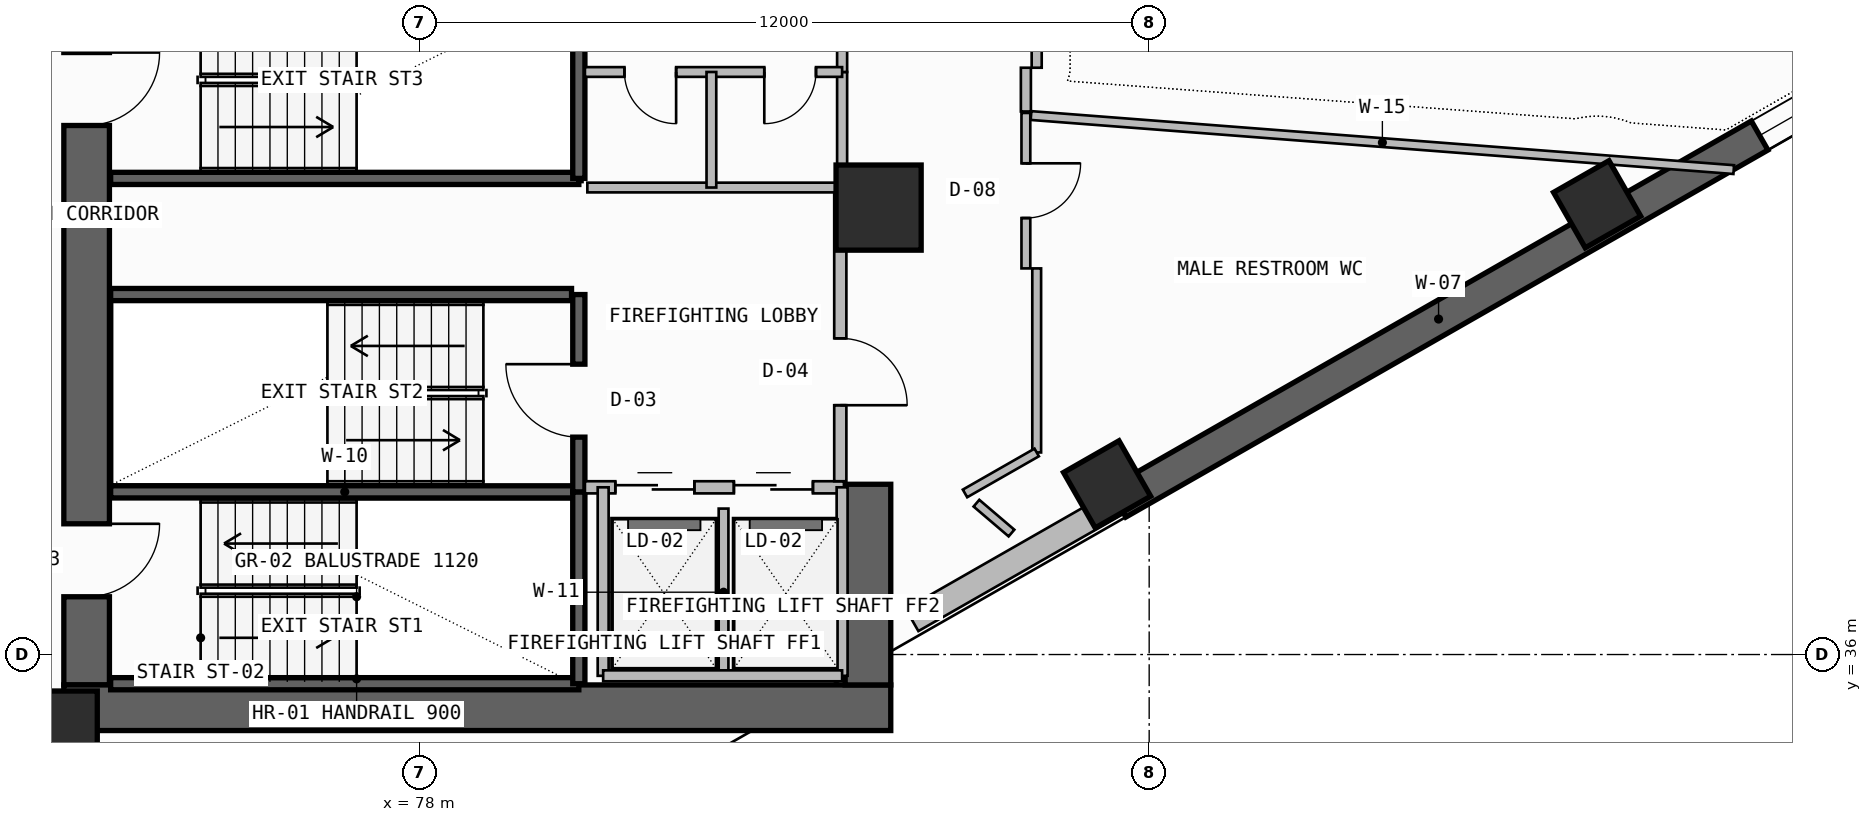
"""IFC4 building model, lengths in metres.
Left out: names, types, materials, properties, quantities, classifications, styles, units other than length and angle.
Written with IfcOpenShell. Run it as: python <this file> out.ifc"""

import sys

from ifc_helpers import new_model, si_unit, direction, frame, frame_2d, origin, origin_2d, place, context, subcontext, project, spatial, rectangle, extrude, element, fill, save


model = new_model("IFC4")
c1 = context("Model", 3, precision=1e-05, world=origin(), true_north=direction((0.0, 1.0)))
c2 = subcontext(c1, "Body", "Model", "MODEL_VIEW")
j1 = project(units=[si_unit("LENGTHUNIT", "METRE"), si_unit("PLANEANGLEUNIT", "RADIAN")], contexts=[c1])
p1 = place(None, origin())
s1 = spatial("IfcSite", under=j1, at=p1, CompositionType="ELEMENT")
p2 = place(p1, origin())
s2 = spatial("IfcBuilding", under=s1, at=p2, CompositionType="ELEMENT")
p3 = place(p2, frame((0.0, 0.0, 218.5)))
s3 = spatial("IfcBuildingStorey", under=s2, at=p3, CompositionType="ELEMENT", Elevation=218.5)
p4 = place(p3, frame((72.525, 35.5, -0.26), z_axis=(0.0, 0.0, 1.0), x_axis=(0.0, 1.0, 0.0)))
e1 = element("IfcWall", 1, at=p4, inside=s3, PredefinedType="SHEAR", context=c2, shape_type="SweptSolid", body=[
    extrude(rectangle(XDim=7.85, YDim=0.75, at=frame_2d((3.925, 0.0))), origin(), (0.0, 0.0, 1.0), 3.52),
])
p5 = place(p4, frame((1.45, 0.0, 0.26)))
e2 = element("IfcOpeningElement", 2, at=p5, cuts=e1, PredefinedType="OPENING", context=c2, shape_type="SweptSolid", body=[
    extrude(rectangle(XDim=1.2, YDim=2.2, at=frame_2d((0.6, 1.1))), frame((0.0, 0.385, 0.0), z_axis=(0.0, -1.0, 0.0), x_axis=(1.0, 0.0, 0.0)), (0.0, 0.0, 1.0), 0.77),
])
p6 = place(p3, frame((72.15, 35.125, -0.26), z_axis=(0.0, 0.0, 1.0), x_axis=(1.0, 0.0, 0.0)))
e3 = element("IfcWall", 3, at=p6, inside=s3, PredefinedType="SHEAR", context=c2, shape_type="SweptSolid", body=[
    extrude(rectangle(XDim=13.6, YDim=0.75, at=frame_2d((6.8, 0.0))), origin(), (0.0, 0.0, 1.0), 3.52),
])
p7 = place(p3, frame((85.375, 35.5, -0.26), z_axis=(0.0, 0.0, 1.0), x_axis=(0.0, 1.0, 0.0)))
e4 = element("IfcWall", 4, at=p7, inside=s3, PredefinedType="SHEAR", context=c2, shape_type="SweptSolid", body=[
    extrude(rectangle(XDim=3.3, YDim=0.75, at=frame_2d((1.65, 0.0))), origin(), (0.0, 0.0, 1.0), 3.52),
])
p8 = place(p3, frame((72.525, 43.35, -0.26), z_axis=(0.0, 0.0, 1.0), x_axis=(0.0, 1.0, 0.0)))
e5 = element("IfcWall", 5, at=p8, inside=s3, PredefinedType="SHEAR", context=c2, shape_type="SweptSolid", body=[
    extrude(rectangle(XDim=12.7, YDim=0.75, at=frame_2d((6.35, 0.0))), origin(), (0.0, 0.0, 1.0), 3.52),
])
p9 = place(p8, frame((1.35, 0.0, 0.26)))
e6 = element("IfcOpeningElement", 6, at=p9, cuts=e5, PredefinedType="OPENING", context=c2, shape_type="SweptSolid", body=[
    extrude(rectangle(XDim=1.2, YDim=2.2, at=frame_2d((0.6, 1.1))), frame((0.0, 0.385, 0.0), z_axis=(0.0, -1.0, 0.0), x_axis=(1.0, 0.0, 0.0)), (0.0, 0.0, 1.0), 0.77),
])
for number, where, z_axis, x_axis in (
    (7, (72.0, 34.7, 0.0), (0.0, 0.0, 1.0), (1.0, 0.0, 0.0)),
    (8, (85.55, 43.35, 0.0), (0.0, 0.0, 1.0), (1.0, 0.0, 0.0)),
):
    element("IfcColumn", number, at=place(p3, frame(where, z_axis=z_axis, x_axis=x_axis)), inside=s3, PredefinedType="COLUMN", context=c2, shape_type="SweptSolid", body=[
        extrude(rectangle(XDim=1.4, YDim=1.4, at=origin_2d()), origin(), (0.0, 0.0, 1.0), 3.52),
    ])
for number, where, z_axis, x_axis in (
    (9, (89.308, 38.799, 0.0), (0.0, 0.0, 1.0), (0.868, 0.496, 0.0)),
    (10, (97.367, 43.405, 0.0), (0.0, 0.0, 1.0), (0.868, 0.496, 0.0)),
):
    element("IfcColumn", number, at=place(p3, frame(where, z_axis=z_axis, x_axis=x_axis)), inside=s3, PredefinedType="COLUMN", context=c2, shape_type="SweptSolid", body=[
        extrude(rectangle(XDim=1.05, YDim=1.05, at=origin_2d()), origin(), (0.0, 0.0, 1.0), 3.52),
    ])
p10 = place(p3, frame((86.1, 36.568, 0.0), z_axis=(0.0, 0.0, 1.0), x_axis=(0.868192956745, 0.496226752461, 0.0)))
e11 = element("IfcWall", 11, at=p10, inside=s3, PredefinedType="SOLIDWALL", context=c2, shape_type="SweptSolid", body=[
    extrude(rectangle(XDim=3.892, YDim=0.42, at=frame_2d((1.946, 0.0))), origin(), (0.0, 0.0, 1.0), 2.245),
])
p11 = place(p3, frame((89.479, 38.499, -0.26), z_axis=(0.0, 0.0, 1.0), x_axis=(0.868197136736, 0.496219439123, 0.0)))
e12 = element("IfcWall", 12, at=p11, inside=s3, PredefinedType="SHEAR", context=c2, shape_type="SweptSolid", body=[
    extrude(rectangle(XDim=17.636, YDim=0.55, at=frame_2d((8.818, 0.0))), origin(), (0.0, 0.0, 1.0), 3.52),
])
p12 = place(p11, frame((12.164, 0.0, 1.1)))
e13 = element("IfcOpeningElement", 13, at=p12, cuts=e12, PredefinedType="OPENING", context=c2, shape_type="SweptSolid", body=[
    extrude(rectangle(XDim=2.4, YDim=1.2, at=frame_2d((1.2, 0.6))), frame((0.0, 0.285, 0.0), z_axis=(0.0, -1.0, 0.0), x_axis=(1.0, 0.0, 0.0)), (0.0, 0.0, 1.0), 0.57),
])
for number, where, z_axis, x_axis in (
    (14, (72.92, 35.52, -0.26), (0.0, 0.0, 1.0), (1.0, 0.0, 0.0)),
    (15, (72.92, 38.675, -0.26), (0.0, 0.0, 1.0), (1.0, 0.0, 0.0)),
):
    element("IfcWall", number, at=place(p3, frame(where, z_axis=z_axis, x_axis=x_axis)), inside=s3, PredefinedType="SOLIDWALL", context=c2, shape_type="SweptSolid", body=[
        extrude(rectangle(XDim=7.7, YDim=0.2, at=frame_2d((3.85, 0.0))), origin(), (0.0, 0.0, 1.0), 3.52),
    ])
p13 = place(p3, frame((80.62, 35.52, -0.26), z_axis=(0.0, 0.0, 1.0), x_axis=(0.0, 1.0, 0.0)))
e16 = element("IfcWall", 16, at=p13, inside=s3, PredefinedType="SOLIDWALL", context=c2, shape_type="SweptSolid", body=[
    extrude(rectangle(XDim=3.155, YDim=0.2, at=frame_2d((1.578, 0.0))), origin(), (0.0, 0.0, 1.0), 3.52),
])
p14 = place(p3, frame((80.62, 38.675, -0.26), z_axis=(0.0, 0.0, 1.0), x_axis=(0.0, 1.0, 0.0)))
e17 = element("IfcWall", 17, at=p14, inside=s3, PredefinedType="SOLIDWALL", context=c2, shape_type="SweptSolid", body=[
    extrude(rectangle(XDim=3.245, YDim=0.2, at=frame_2d((1.623, 0.0))), origin(), (0.0, 0.0, 1.0), 3.52),
])
p15 = place(p14, frame((0.9, 0.0, 0.26)))
e18 = element("IfcOpeningElement", 18, at=p15, cuts=e17, PredefinedType="OPENING", context=c2, shape_type="SweptSolid", body=[
    extrude(rectangle(XDim=1.2, YDim=2.2, at=frame_2d((0.6, 1.1))), frame((0.0, 0.11, 0.0), z_axis=(0.0, -1.0, 0.0), x_axis=(1.0, 0.0, 0.0)), (0.0, 0.0, 1.0), 0.22),
])
p16 = place(p3, frame((80.72, 38.75, 0.0), z_axis=(0.0, 0.0, 1.0), x_axis=(1.0, 0.0, 0.0)))
e19 = element("IfcWall", 19, at=p16, inside=s3, PredefinedType="SOLIDWALL", context=c2, shape_type="SweptSolid", body=[
    extrude(rectangle(XDim=4.26, YDim=0.2, at=frame_2d((2.13, 0.0))), origin(), (0.0, 0.0, 1.0), 3.26),
])
p17 = place(p16, frame((0.5, 0.0, 0.0)))
e20 = element("IfcOpeningElement", 20, at=p17, cuts=e19, PredefinedType="OPENING", context=c2, shape_type="SweptSolid", body=[
    extrude(rectangle(XDim=1.3, YDim=2.3, at=frame_2d((0.65, 1.15))), frame((0.0, 0.11, 0.0), z_axis=(0.0, -1.0, 0.0), x_axis=(1.0, 0.0, 0.0)), (0.0, 0.0, 1.0), 0.22),
])
p18 = place(p16, frame((2.45, 0.0, 0.0)))
e21 = element("IfcOpeningElement", 21, at=p18, cuts=e19, PredefinedType="OPENING", context=c2, shape_type="SweptSolid", body=[
    extrude(rectangle(XDim=1.3, YDim=2.3, at=frame_2d((0.65, 1.15))), frame((0.0, 0.11, 0.0), z_axis=(0.0, -1.0, 0.0), x_axis=(1.0, 0.0, 0.0)), (0.0, 0.0, 1.0), 0.22),
])
p19 = place(p3, frame((83.0, 35.65, 0.0), z_axis=(0.0, 0.0, 1.0), x_axis=(0.0, 1.0, 0.0)))
e22 = element("IfcWall", 22, at=p19, inside=s3, PredefinedType="PLUMBINGWALL", context=c2, shape_type="SweptSolid", body=[
    extrude(rectangle(XDim=2.75, YDim=0.16, at=frame_2d((1.375, 0.0))), origin(), (0.0, 0.0, 1.0), 3.26),
])
for number, where, z_axis, x_axis in (
    (23, (84.95, 35.65, 0.0), (0.0, 0.0, 1.0), (0.0, 1.0, 0.0)),
    (24, (81.02, 35.65, 0.0), (0.0, 0.0, 1.0), (0.0, 1.0, 0.0)),
):
    element("IfcWall", number, at=place(p3, frame(where, z_axis=z_axis, x_axis=x_axis)), inside=s3, PredefinedType="SOLIDWALL", context=c2, shape_type="SweptSolid", body=[
        extrude(rectangle(XDim=3.1, YDim=0.18, at=frame_2d((1.55, 0.0))), origin(), (0.0, 0.0, 1.0), 3.26),
    ])
p20 = place(p3, frame((81.02, 35.65, 0.0), z_axis=(0.0, 0.0, 1.0), x_axis=(1.0, 0.0, 0.0)))
e25 = element("IfcWall", 25, at=p20, inside=s3, PredefinedType="SOLIDWALL", context=c2, shape_type="SweptSolid", body=[
    extrude(rectangle(XDim=3.93, YDim=0.18, at=frame_2d((1.965, 0.0))), origin(), (0.0, 0.0, 1.0), 3.26),
])
p21 = place(p3, frame((84.92, 38.85, 0.0), z_axis=(0.0, 0.0, 1.0), x_axis=(0.0, 1.0, 0.0)))
e26 = element("IfcWall", 26, at=p21, inside=s3, PredefinedType="SOLIDWALL", context=c2, shape_type="SweptSolid", body=[
    extrude(rectangle(XDim=4.83, YDim=0.2, at=frame_2d((2.415, 0.0))), origin(), (0.0, 0.0, 1.0), 3.26),
])
p22 = place(p21, frame((1.25, 0.0, 0.0)))
e27 = element("IfcOpeningElement", 27, at=p22, cuts=e26, PredefinedType="OPENING", context=c2, shape_type="SweptSolid", body=[
    extrude(rectangle(XDim=1.1, YDim=2.2, at=frame_2d((0.55, 1.1))), frame((0.0, 0.11, 0.0), z_axis=(0.0, -1.0, 0.0), x_axis=(1.0, 0.0, 0.0)), (0.0, 0.0, 1.0), 0.22),
])
p23 = place(p3, frame((72.92, 41.92, -0.26), z_axis=(0.0, 0.0, 1.0), x_axis=(1.0, 0.0, 0.0)))
e28 = element("IfcWall", 28, at=p23, inside=s3, PredefinedType="SOLIDWALL", context=c2, shape_type="SweptSolid", body=[
    extrude(rectangle(XDim=7.58, YDim=0.2, at=frame_2d((3.79, 0.0))), origin(), (0.0, 0.0, 1.0), 3.52),
])
p24 = place(p3, frame((72.92, 43.83, -0.26), z_axis=(0.0, 0.0, 1.0), x_axis=(1.0, 0.0, 0.0)))
e29 = element("IfcWall", 29, at=p24, inside=s3, PredefinedType="SOLIDWALL", context=c2, shape_type="SweptSolid", body=[
    extrude(rectangle(XDim=7.7, YDim=0.2, at=frame_2d((3.85, 0.0))), origin(), (0.0, 0.0, 1.0), 3.52),
])
p25 = place(p3, frame((80.62, 43.83, -0.26), z_axis=(0.0, 0.0, 1.0), x_axis=(0.0, 1.0, 0.0)))
e30 = element("IfcWall", 30, at=p25, inside=s3, PredefinedType="SOLIDWALL", context=c2, shape_type="SweptSolid", body=[
    extrude(rectangle(XDim=3.24, YDim=0.2, at=frame_2d((1.62, 0.0))), origin(), (0.0, 0.0, 1.0), 3.52),
])
p26 = place(p3, frame((84.95, 43.68, 0.0), z_axis=(0.0, 0.0, 1.0), x_axis=(0.0, 1.0, 0.0)))
e31 = element("IfcWall", 31, at=p26, inside=s3, PredefinedType="PLUMBINGWALL", context=c2, shape_type="SweptSolid", body=[
    extrude(rectangle(XDim=1.9, YDim=0.165, at=frame_2d((0.95, 0.0))), origin(), (0.0, 0.0, 1.0), 3.26),
])
p27 = place(p3, frame((84.95, 45.58, 0.0), z_axis=(0.0, 0.0, 1.0), x_axis=(0.0, 1.0, 0.0)))
e32 = element("IfcWall", 32, at=p27, inside=s3, PredefinedType="PARTITIONING", context=c2, shape_type="SweptSolid", body=[
    extrude(rectangle(XDim=2.12, YDim=0.165, at=frame_2d((1.06, 0.0))), origin(), (0.0, 0.0, 1.0), 3.26),
])
p28 = place(p27, frame((0.56, 0.0, 0.0)))
e33 = element("IfcOpeningElement", 33, at=p28, cuts=e32, PredefinedType="OPENING", context=c2, shape_type="SweptSolid", body=[
    extrude(rectangle(XDim=1.0, YDim=2.2, at=frame_2d((0.5, 1.1))), frame((0.0, 0.093, 0.0), z_axis=(0.0, -1.0, 0.0), x_axis=(1.0, 0.0, 0.0)), (0.0, 0.0, 1.0), 0.185),
])
p29 = place(p3, frame((80.72, 45.58, 0.0), z_axis=(0.0, 0.0, 1.0), x_axis=(1.0, 0.0, 0.0)))
e34 = element("IfcWall", 34, at=p29, inside=s3, PredefinedType="PLUMBINGWALL", context=c2, shape_type="SweptSolid", body=[
    extrude(rectangle(XDim=4.23, YDim=0.16, at=frame_2d((2.115, 0.0))), origin(), (0.0, 0.0, 1.0), 3.26),
])
p30 = place(p29, frame((0.65, 0.0, 0.0)))
e35 = element("IfcOpeningElement", 35, at=p30, cuts=e34, PredefinedType="OPENING", context=c2, shape_type="SweptSolid", body=[
    extrude(rectangle(XDim=0.85, YDim=2.05, at=frame_2d((0.425, 1.025))), frame((0.0, 0.09, 0.0), z_axis=(0.0, -1.0, 0.0), x_axis=(1.0, 0.0, 0.0)), (0.0, 0.0, 1.0), 0.18),
])
p31 = place(p29, frame((2.95, 0.0, 0.0)))
e36 = element("IfcOpeningElement", 36, at=p31, cuts=e34, PredefinedType="OPENING", context=c2, shape_type="SweptSolid", body=[
    extrude(rectangle(XDim=0.85, YDim=2.05, at=frame_2d((0.425, 1.025))), frame((0.0, 0.09, 0.0), z_axis=(0.0, -1.0, 0.0), x_axis=(1.0, 0.0, 0.0)), (0.0, 0.0, 1.0), 0.18),
])
p32 = place(p3, frame((80.76, 43.68, 0.0), z_axis=(0.0, 0.0, 1.0), x_axis=(1.0, 0.0, 0.0)))
e37 = element("IfcWall", 37, at=p32, inside=s3, PredefinedType="PLUMBINGWALL", context=c2, shape_type="SweptSolid", body=[
    extrude(rectangle(XDim=4.19, YDim=0.16, at=frame_2d((2.095, 0.0))), origin(), (0.0, 0.0, 1.0), 3.26),
])
p33 = place(p3, frame((82.8, 43.68, 0.0), z_axis=(0.0, 0.0, 1.0), x_axis=(0.0, 1.0, 0.0)))
e38 = element("IfcWall", 38, at=p33, inside=s3, PredefinedType="PLUMBINGWALL", context=c2, shape_type="SweptSolid", body=[
    extrude(rectangle(XDim=1.9, YDim=0.16, at=frame_2d((0.95, 0.0))), origin(), (0.0, 0.0, 1.0), 3.26),
])
p34 = place(p3, frame((88.15, 39.323, 0.0), z_axis=(0.0, 0.0, 1.0), x_axis=(0.0, 1.0, 0.0)))
e39 = element("IfcWall", 39, at=p34, inside=s3, PredefinedType="PARTITIONING", context=c2, shape_type="SweptSolid", body=[
    extrude(rectangle(XDim=3.027, YDim=0.145, at=frame_2d((1.514, 0.0))), origin(), (0.0, 0.0, 1.0), 2.745),
])
p35 = place(p3, frame((87.972, 42.35, 0.0), z_axis=(0.0, 0.0, 1.0), x_axis=(0.0, 1.0, 0.0)))
e40 = element("IfcWall", 40, at=p35, inside=s3, PredefinedType="PARTITIONING", context=c2, shape_type="SweptSolid", body=[
    extrude(rectangle(XDim=2.556, YDim=0.145, at=frame_2d((1.278, 0.0))), origin(), (0.0, 0.0, 1.0), 2.745),
])
p36 = place(p35, frame((0.828, 0.0, 0.0)))
e41 = element("IfcOpeningElement", 41, at=p36, cuts=e40, PredefinedType="OPENING", context=c2, shape_type="SweptSolid", body=[
    extrude(rectangle(XDim=0.9, YDim=2.1, at=frame_2d((0.45, 1.05))), frame((0.0, 0.083, 0.0), z_axis=(0.0, -1.0, 0.0), x_axis=(1.0, 0.0, 0.0)), (0.0, 0.0, 1.0), 0.165),
])
p37 = place(p3, frame((86.971, 38.649, 0.0), z_axis=(0.0, 0.0, 1.0), x_axis=(0.868232075283, 0.496158304827, 0.0)))
e42 = element("IfcWall", 42, at=p37, inside=s3, PredefinedType="PARTITIONING", context=c2, shape_type="SweptSolid", body=[
    extrude(rectangle(XDim=1.358, YDim=0.145, at=frame_2d((0.679, 0.0))), origin(), (0.0, 0.0, 1.0), 3.26),
])
p38 = place(p3, frame((88.057, 44.864, 0.0), z_axis=(0.0, 0.0, 1.0), x_axis=(0.997053618179, -0.07670777324, 0.0)))
e43 = element("IfcWall", 43, at=p38, inside=s3, PredefinedType="PARTITIONING", context=c2, shape_type="SweptSolid", body=[
    extrude(rectangle(XDim=11.592, YDim=0.145, at=frame_2d((5.796, 0.0))), origin(), (0.0, 0.0, 1.0), 2.245),
])
p39 = place(p3, frame((88.15, 45.65, 0.0), z_axis=(0.0, 0.0, 1.0), x_axis=(0.0, 1.0, 0.0)))
e44 = element("IfcWall", 44, at=p39, inside=s3, PredefinedType="PARTITIONING", context=c2, shape_type="SweptSolid", body=[
    extrude(rectangle(XDim=1.97, YDim=0.165, at=frame_2d((0.985, 0.0))), origin(), (0.0, 0.0, 1.0), 3.26),
])
p40 = place(p39, frame((0.535, 0.0, 0.0)))
e45 = element("IfcOpeningElement", 45, at=p40, cuts=e44, PredefinedType="OPENING", context=c2, shape_type="SweptSolid", body=[
    extrude(rectangle(XDim=0.9, YDim=2.1, at=frame_2d((0.45, 1.05))), frame((0.0, 0.093, 0.0), z_axis=(0.0, -1.0, 0.0), x_axis=(1.0, 0.0, 0.0)), (0.0, 0.0, 1.0), 0.185),
])
p41 = place(p3, frame((87.972, 44.93, 0.0), z_axis=(0.0, 0.0, 1.0), x_axis=(0.0, 1.0, 0.0)))
e46 = element("IfcWall", 46, at=p41, inside=s3, PredefinedType="PARTITIONING", context=c2, shape_type="SweptSolid", body=[
    extrude(rectangle(XDim=0.719, YDim=0.165, at=frame_2d((0.36, 0.0))), origin(), (0.0, 0.0, 1.0), 3.26),
])
p42 = place(p3, frame((87.735, 37.998, 0.0), z_axis=(0.0, 0.0, 1.0), x_axis=(-0.760983773589, 0.64877091206, 0.0)))
e47 = element("IfcWall", 47, at=p42, inside=s3, PredefinedType="PARTITIONING", context=c2, shape_type="SweptSolid", body=[
    extrude(rectangle(XDim=0.757, YDim=0.145, at=frame_2d((0.378, 0.0))), origin(), (0.0, 0.0, 1.0), 3.26),
])
p43 = place(p12, origin())
e48 = element("IfcWindow", 48, at=p43, inside=s3, PartitioningType="SINGLE_PANEL", PredefinedType="WINDOW", context=c2, shape_type="SweptSolid", body=[
    extrude(rectangle(XDim=2.4, YDim=1.2, at=frame_2d((1.2, 0.6))), frame((0.0, 0.03, 0.0), z_axis=(0.0, -1.0, 0.0), x_axis=(1.0, 0.0, 0.0)), (0.0, 0.0, 1.0), 0.06),
])
fill(e13, e48)
p44 = place(p5, frame((1.2, 0.0, 0.0), z_axis=(0.0, 0.0, 1.0), x_axis=(-1.0, 0.0, 0.0)))
e49 = element("IfcDoor", 49, at=p44, inside=s3, OperationType="SINGLE_SWING_LEFT", PredefinedType="USERDEFINED", context=c2, shape_type="SweptSolid", body=[
    extrude(rectangle(XDim=1.2, YDim=2.2, at=frame_2d((0.6, 1.1))), frame((0.0, 0.025, 0.0), z_axis=(0.0, -1.0, 0.0), x_axis=(1.0, 0.0, 0.0)), (0.0, 0.0, 1.0), 0.05),
])
fill(e2, e49)
p45 = place(p15, origin())
e50 = element("IfcDoor", 50, at=p45, inside=s3, OperationType="SINGLE_SWING_RIGHT", PredefinedType="USERDEFINED", context=c2, shape_type="SweptSolid", body=[
    extrude(rectangle(XDim=1.2, YDim=2.2, at=frame_2d((0.6, 1.1))), frame((0.0, 0.025, 0.0), z_axis=(0.0, -1.0, 0.0), x_axis=(1.0, 0.0, 0.0)), (0.0, 0.0, 1.0), 0.05),
])
fill(e18, e50)
p46 = place(p17, origin())
e51 = element("IfcDoor", 51, at=p46, inside=s3, OperationType="DOUBLE_DOOR_SLIDING", PredefinedType="DOOR", context=c2, shape_type="SweptSolid", body=[
    extrude(rectangle(XDim=1.3, YDim=2.3, at=frame_2d((0.65, 1.15))), frame((0.0, 0.025, 0.0), z_axis=(0.0, -1.0, 0.0), x_axis=(1.0, 0.0, 0.0)), (0.0, 0.0, 1.0), 0.05),
])
fill(e20, e51)
p47 = place(p18, origin())
e52 = element("IfcDoor", 52, at=p47, inside=s3, OperationType="DOUBLE_DOOR_SLIDING", PredefinedType="DOOR", context=c2, shape_type="SweptSolid", body=[
    extrude(rectangle(XDim=1.3, YDim=2.3, at=frame_2d((0.65, 1.15))), frame((0.0, 0.025, 0.0), z_axis=(0.0, -1.0, 0.0), x_axis=(1.0, 0.0, 0.0)), (0.0, 0.0, 1.0), 0.05),
])
fill(e21, e52)
p48 = place(p22, frame((1.1, 0.0, 0.0), z_axis=(0.0, 0.0, 1.0), x_axis=(-1.0, 0.0, 0.0)))
e53 = element("IfcDoor", 53, at=p48, inside=s3, OperationType="SINGLE_SWING_RIGHT", PredefinedType="DOOR", context=c2, shape_type="SweptSolid", body=[
    extrude(rectangle(XDim=1.1, YDim=2.2, at=frame_2d((0.55, 1.1))), frame((0.0, 0.025, 0.0), z_axis=(0.0, -1.0, 0.0), x_axis=(1.0, 0.0, 0.0)), (0.0, 0.0, 1.0), 0.05),
])
fill(e27, e53)
p49 = place(p9, frame((1.2, 0.0, 0.0), z_axis=(0.0, 0.0, 1.0), x_axis=(-1.0, 0.0, 0.0)))
e54 = element("IfcDoor", 54, at=p49, inside=s3, OperationType="SINGLE_SWING_LEFT", PredefinedType="USERDEFINED", context=c2, shape_type="SweptSolid", body=[
    extrude(rectangle(XDim=1.2, YDim=2.2, at=frame_2d((0.6, 1.1))), frame((0.0, 0.025, 0.0), z_axis=(0.0, -1.0, 0.0), x_axis=(1.0, 0.0, 0.0)), (0.0, 0.0, 1.0), 0.05),
])
fill(e6, e54)
p50 = place(p30, frame((0.85, 0.0, 0.0), z_axis=(0.0, 0.0, 1.0), x_axis=(-1.0, 0.0, 0.0)))
e55 = element("IfcDoor", 55, at=p50, inside=s3, OperationType="SINGLE_SWING_LEFT", PredefinedType="DOOR", context=c2, shape_type="SweptSolid", body=[
    extrude(rectangle(XDim=0.85, YDim=2.05, at=frame_2d((0.425, 1.025))), frame((0.0, 0.025, 0.0), z_axis=(0.0, -1.0, 0.0), x_axis=(1.0, 0.0, 0.0)), (0.0, 0.0, 1.0), 0.05),
])
fill(e35, e55)
p51 = place(p31, frame((0.85, 0.0, 0.0), z_axis=(0.0, 0.0, 1.0), x_axis=(-1.0, 0.0, 0.0)))
e56 = element("IfcDoor", 56, at=p51, inside=s3, OperationType="SINGLE_SWING_RIGHT", PredefinedType="DOOR", context=c2, shape_type="SweptSolid", body=[
    extrude(rectangle(XDim=0.85, YDim=2.05, at=frame_2d((0.425, 1.025))), frame((0.0, 0.025, 0.0), z_axis=(0.0, -1.0, 0.0), x_axis=(1.0, 0.0, 0.0)), (0.0, 0.0, 1.0), 0.05),
])
fill(e36, e56)
p52 = place(p36, frame((0.9, 0.0, 0.0), z_axis=(0.0, 0.0, 1.0), x_axis=(-1.0, 0.0, 0.0)))
e57 = element("IfcDoor", 57, at=p52, inside=s3, OperationType="SINGLE_SWING_LEFT", PredefinedType="DOOR", context=c2, shape_type="SweptSolid", body=[
    extrude(rectangle(XDim=0.9, YDim=2.1, at=frame_2d((0.45, 1.05))), frame((0.0, 0.025, 0.0), z_axis=(0.0, -1.0, 0.0), x_axis=(1.0, 0.0, 0.0)), (0.0, 0.0, 1.0), 0.05),
])
fill(e41, e57)
save(model, sys.argv[1])
